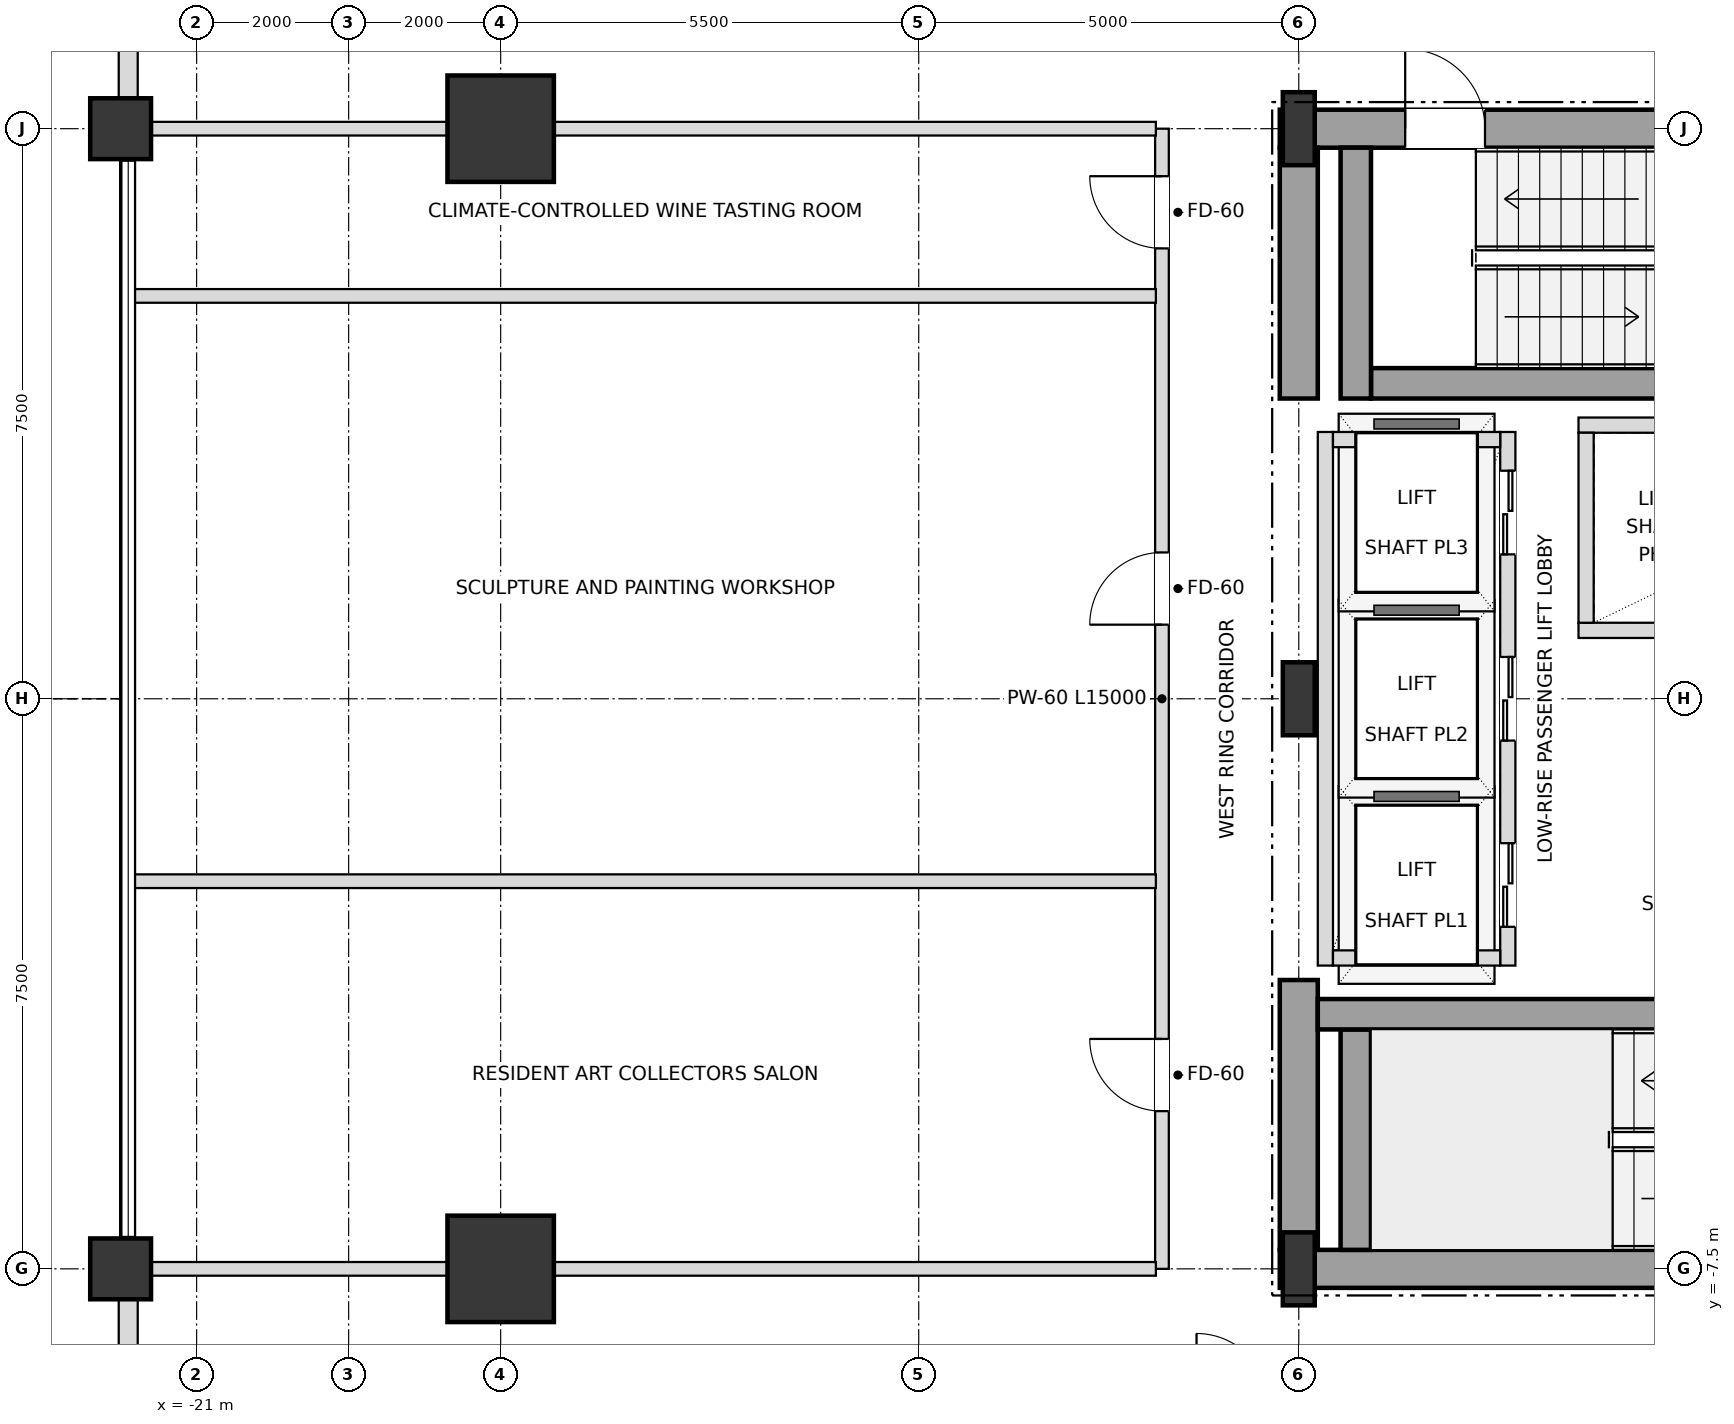
"""IFC4 building model, lengths in metres.
Left out: names, types, materials, properties, quantities, classifications, styles, units other than length and angle.
Written with IfcOpenShell. Run it as: python <this file> out.ifc"""

import sys

from ifc_helpers import new_model, si_unit, direction, frame, frame_2d, origin, origin_2d, place, context, subcontext, project, spatial, rectangle, i_section, extrude, element, fill, save


model = new_model("IFC4")
c1 = context("Model", 3, precision=1e-05, world=origin(), true_north=direction((0.0, 1.0)))
c2 = subcontext(c1, "Body", "Model", "MODEL_VIEW")
j1 = project(units=[si_unit("LENGTHUNIT", "METRE"), si_unit("PLANEANGLEUNIT", "RADIAN")], contexts=[c1])
p1 = place(None, origin())
s1 = spatial("IfcSite", under=j1, at=p1, CompositionType="ELEMENT")
p2 = place(p1, origin())
s2 = spatial("IfcBuilding", under=s1, at=p2, CompositionType="ELEMENT")
p3 = place(p2, frame((0.0, 0.0, 82.8)))
s3 = spatial("IfcBuildingStorey", under=s2, at=p3, CompositionType="ELEMENT", Elevation=82.8)
for number, where, z_axis, x_axis in (
    (1, (-6.5, -7.5, 0.0), (0.0, 0.0, 1.0), (1.0, 0.0, 0.0)),
    (2, (-6.5, 0.0, 0.0), (0.0, 0.0, 1.0), (1.0, 0.0, 0.0)),
    (3, (-6.5, 7.5, 0.0), (0.0, 0.0, 1.0), (1.0, 0.0, 0.0)),
):
    element("IfcColumn", number, at=place(p3, frame(where, z_axis=z_axis, x_axis=x_axis)), inside=s3, PredefinedType="COLUMN", context=c2, shape_type="SweptSolid", body=[
        extrude(i_section(OverallWidth=0.42, OverallDepth=0.96, WebThickness=0.022, FlangeThickness=0.034, at=origin_2d()), origin(), (0.0, 0.0, 1.0), 3.6),
    ])
for number, where, z_axis, x_axis in (
    (4, (-17.0, 7.5, 0.0), (0.0, 0.0, 1.0), (1.0, 0.0, 0.0)),
    (5, (-17.0, -7.5, 0.0), (0.0, 0.0, 1.0), (1.0, 0.0, 0.0)),
):
    element("IfcColumn", number, at=place(p3, frame(where, z_axis=z_axis, x_axis=x_axis)), inside=s3, PredefinedType="USERDEFINED", context=c2, shape_type="SweptSolid", body=[
        extrude(rectangle(XDim=1.4, YDim=1.4, at=origin_2d()), origin(), (0.0, 0.0, 1.0), 3.6),
    ])
for number, where, z_axis, x_axis in (
    (6, (-22.0, -7.5, 0.0), (0.0, 0.0, 1.0), (1.0, 0.0, 0.0)),
    (7, (-22.0, 7.5, 0.0), (0.0, 0.0, 1.0), (1.0, 0.0, 0.0)),
):
    element("IfcColumn", number, at=place(p3, frame(where, z_axis=z_axis, x_axis=x_axis)), inside=s3, PredefinedType="COLUMN", context=c2, shape_type="SweptSolid", body=[
        extrude(rectangle(XDim=0.8, YDim=0.8, at=origin_2d()), origin(), (0.0, 0.0, 1.0), 3.6),
    ])
p4 = place(p3, frame((-21.9, 12.605, 0.0), z_axis=(0.0, 0.0, 1.0), x_axis=(0.0, -1.0, 0.0)))
e8 = element("IfcWall", 8, at=p4, inside=s3, PredefinedType="SOLIDWALL", context=c2, shape_type="SweptSolid", body=[
    extrude(rectangle(XDim=4.71, YDim=0.25, at=frame_2d((2.355, 0.0))), origin(), (0.0, 0.0, 1.0), 2.736),
])
p5 = place(p4, frame((1.455, 0.0, 0.72)))
e9 = element("IfcOpeningElement", 9, at=p5, cuts=e8, PredefinedType="OPENING", context=c2, shape_type="SweptSolid", body=[
    extrude(rectangle(XDim=1.8, YDim=1.68, at=frame_2d((0.9, 0.84))), frame((0.0, 0.135, 0.0), z_axis=(0.0, -1.0, 0.0), x_axis=(1.0, 0.0, 0.0)), (0.0, 0.0, 1.0), 0.27),
])
p6 = place(p3, frame((-21.9, -7.895, 0.0), z_axis=(0.0, 0.0, 1.0), x_axis=(0.0, -1.0, 0.0)))
e10 = element("IfcWall", 10, at=p6, inside=s3, PredefinedType="SOLIDWALL", context=c2, shape_type="SweptSolid", body=[
    extrude(rectangle(XDim=4.71, YDim=0.25, at=frame_2d((2.355, 0.0))), origin(), (0.0, 0.0, 1.0), 2.736),
])
p7 = place(p6, frame((1.455, 0.0, 0.72)))
e11 = element("IfcOpeningElement", 11, at=p7, cuts=e10, PredefinedType="OPENING", context=c2, shape_type="SweptSolid", body=[
    extrude(rectangle(XDim=1.8, YDim=1.68, at=frame_2d((0.9, 0.84))), frame((0.0, 0.135, 0.0), z_axis=(0.0, -1.0, 0.0), x_axis=(1.0, 0.0, 0.0)), (0.0, 0.0, 1.0), 0.27),
])
p8 = place(p3, frame((-6.75, -7.5, 0.0), z_axis=(0.0, 0.0, 1.0), x_axis=(1.0, 0.0, 0.0)))
e12 = element("IfcWall", 12, at=p8, inside=s3, PredefinedType="SHEAR", context=c2, shape_type="SweptSolid", body=[
    extrude(rectangle(XDim=6.75, YDim=0.5, at=frame_2d((3.375, 0.0))), origin(), (0.0, 0.0, 1.0), 3.38),
])
p9 = place(p3, frame((-6.75, 7.5, 0.0), z_axis=(0.0, 0.0, 1.0), x_axis=(1.0, 0.0, 0.0)))
e13 = element("IfcWall", 13, at=p9, inside=s3, PredefinedType="SHEAR", context=c2, shape_type="SweptSolid", body=[
    extrude(rectangle(XDim=6.75, YDim=0.5, at=frame_2d((3.375, 0.0))), origin(), (0.0, 0.0, 1.0), 3.38),
])
p10 = place(p9, frame((1.65, 0.0, 0.0)))
e14 = element("IfcOpeningElement", 14, at=p10, cuts=e13, PredefinedType="OPENING", context=c2, shape_type="SweptSolid", body=[
    extrude(rectangle(XDim=1.05, YDim=2.15, at=frame_2d((0.525, 1.075))), frame((0.0, 0.26, 0.0), z_axis=(0.0, -1.0, 0.0), x_axis=(1.0, 0.0, 0.0)), (0.0, 0.0, 1.0), 0.52),
])
p11 = place(p3, frame((-6.5, -7.25, 0.0), z_axis=(0.0, 0.0, 1.0), x_axis=(0.0, 1.0, 0.0)))
e15 = element("IfcWall", 15, at=p11, inside=s3, PredefinedType="SHEAR", context=c2, shape_type="SweptSolid", body=[
    extrude(rectangle(XDim=3.55, YDim=0.5, at=frame_2d((1.775, 0.0))), origin(), (0.0, 0.0, 1.0), 3.38),
])
p12 = place(p3, frame((-6.5, 3.95, 0.0), z_axis=(0.0, 0.0, 1.0), x_axis=(0.0, 1.0, 0.0)))
e16 = element("IfcWall", 16, at=p12, inside=s3, PredefinedType="SHEAR", context=c2, shape_type="SweptSolid", body=[
    extrude(rectangle(XDim=3.3, YDim=0.5, at=frame_2d((1.65, 0.0))), origin(), (0.0, 0.0, 1.0), 3.38),
])
p13 = place(p3, frame((-5.75, -7.25, 0.0), z_axis=(0.0, 0.0, 1.0), x_axis=(0.0, 1.0, 0.0)))
e17 = element("IfcWall", 17, at=p13, inside=s3, PredefinedType="SHEAR", context=c2, shape_type="SweptSolid", body=[
    extrude(rectangle(XDim=2.9, YDim=0.4, at=frame_2d((1.45, 0.0))), origin(), (0.0, 0.0, 1.0), 3.38),
])
p14 = place(p3, frame((-6.25, -4.15, 0.0), z_axis=(0.0, 0.0, 1.0), x_axis=(1.0, 0.0, 0.0)))
e18 = element("IfcWall", 18, at=p14, inside=s3, PredefinedType="SHEAR", context=c2, shape_type="SweptSolid", body=[
    extrude(rectangle(XDim=7.78, YDim=0.4, at=frame_2d((3.89, 0.0))), origin(), (0.0, 0.0, 1.0), 3.38),
])
p15 = place(p3, frame((-5.55, 4.15, 0.0), z_axis=(0.0, 0.0, 1.0), x_axis=(1.0, 0.0, 0.0)))
e19 = element("IfcWall", 19, at=p15, inside=s3, PredefinedType="SHEAR", context=c2, shape_type="SweptSolid", body=[
    extrude(rectangle(XDim=7.08, YDim=0.4, at=frame_2d((3.54, 0.0))), origin(), (0.0, 0.0, 1.0), 3.38),
])
p16 = place(p3, frame((-5.75, 3.95, 0.0), z_axis=(0.0, 0.0, 1.0), x_axis=(0.0, 1.0, 0.0)))
e20 = element("IfcWall", 20, at=p16, inside=s3, PredefinedType="SHEAR", context=c2, shape_type="SweptSolid", body=[
    extrude(rectangle(XDim=3.3, YDim=0.4, at=frame_2d((1.65, 0.0))), origin(), (0.0, 0.0, 1.0), 3.38),
])
p17 = place(p3, frame((-3.75, -3.51, 0.0), z_axis=(0.0, 0.0, 1.0), x_axis=(0.0, 1.0, 0.0)))
e21 = element("IfcWall", 21, at=p17, inside=s3, PredefinedType="SOLIDWALL", context=c2, shape_type="SweptSolid", body=[
    extrude(rectangle(XDim=7.02, YDim=0.2, at=frame_2d((3.51, 0.0))), origin(), (0.0, 0.0, 1.0), 3.38),
])
p18 = place(p17, frame((0.51, 0.0, 0.0)))
e22 = element("IfcOpeningElement", 22, at=p18, cuts=e21, PredefinedType="OPENING", context=c2, shape_type="SweptSolid", body=[
    extrude(rectangle(XDim=1.1, YDim=2.15, at=frame_2d((0.55, 1.075))), frame((0.0, 0.11, 0.0), z_axis=(0.0, -1.0, 0.0), x_axis=(1.0, 0.0, 0.0)), (0.0, 0.0, 1.0), 0.22),
])
p19 = place(p17, frame((2.96, 0.0, 0.0)))
e23 = element("IfcOpeningElement", 23, at=p19, cuts=e21, PredefinedType="OPENING", context=c2, shape_type="SweptSolid", body=[
    extrude(rectangle(XDim=1.1, YDim=2.15, at=frame_2d((0.55, 1.075))), frame((0.0, 0.11, 0.0), z_axis=(0.0, -1.0, 0.0), x_axis=(1.0, 0.0, 0.0)), (0.0, 0.0, 1.0), 0.22),
])
p20 = place(p17, frame((5.41, 0.0, 0.0)))
e24 = element("IfcOpeningElement", 24, at=p20, cuts=e21, PredefinedType="OPENING", context=c2, shape_type="SweptSolid", body=[
    extrude(rectangle(XDim=1.1, YDim=2.15, at=frame_2d((0.55, 1.075))), frame((0.0, 0.11, 0.0), z_axis=(0.0, -1.0, 0.0), x_axis=(1.0, 0.0, 0.0)), (0.0, 0.0, 1.0), 0.22),
])
p21 = place(p3, frame((-6.15, -3.51, 0.0), z_axis=(0.0, 0.0, 1.0), x_axis=(0.0, 1.0, 0.0)))
e25 = element("IfcWall", 25, at=p21, inside=s3, PredefinedType="SOLIDWALL", context=c2, shape_type="SweptSolid", body=[
    extrude(rectangle(XDim=7.02, YDim=0.2, at=frame_2d((3.51, 0.0))), origin(), (0.0, 0.0, 1.0), 3.38),
])
for number, where, z_axis, x_axis in (
    (26, (-6.05, -3.41, 0.0), (0.0, 0.0, 1.0), (1.0, 0.0, 0.0)),
    (27, (-6.05, 3.41, 0.0), (0.0, 0.0, 1.0), (1.0, 0.0, 0.0)),
):
    element("IfcWall", number, at=place(p3, frame(where, z_axis=z_axis, x_axis=x_axis)), inside=s3, PredefinedType="SOLIDWALL", context=c2, shape_type="SweptSolid", body=[
        extrude(rectangle(XDim=2.2, YDim=0.2, at=frame_2d((1.1, 0.0))), origin(), (0.0, 0.0, 1.0), 3.38),
    ])
p22 = place(p3, frame((-2.82, 0.9, 0.0), z_axis=(0.0, 0.0, 1.0), x_axis=(1.0, 0.0, 0.0)))
e28 = element("IfcWall", 28, at=p22, inside=s3, PredefinedType="SOLIDWALL", context=c2, shape_type="SweptSolid", body=[
    extrude(rectangle(XDim=5.58, YDim=0.2, at=frame_2d((2.79, 0.0))), origin(), (0.0, 0.0, 1.0), 3.38),
])
p23 = place(p22, frame((3.86, 0.0, 0.0)))
e29 = element("IfcOpeningElement", 29, at=p23, cuts=e28, PredefinedType="OPENING", context=c2, shape_type="SweptSolid", body=[
    extrude(rectangle(XDim=1.2, YDim=2.2, at=frame_2d((0.6, 1.1))), frame((0.0, 0.11, 0.0), z_axis=(0.0, -1.0, 0.0), x_axis=(1.0, 0.0, 0.0)), (0.0, 0.0, 1.0), 0.22),
])
p24 = place(p3, frame((-2.82, 3.6, 0.0), z_axis=(0.0, 0.0, 1.0), x_axis=(1.0, 0.0, 0.0)))
e30 = element("IfcWall", 30, at=p24, inside=s3, PredefinedType="SOLIDWALL", context=c2, shape_type="SweptSolid", body=[
    extrude(rectangle(XDim=5.58, YDim=0.2, at=frame_2d((2.79, 0.0))), origin(), (0.0, 0.0, 1.0), 3.38),
])
p25 = place(p3, frame((-2.72, 1.0, 0.0), z_axis=(0.0, 0.0, 1.0), x_axis=(0.0, 1.0, 0.0)))
e31 = element("IfcWall", 31, at=p25, inside=s3, PredefinedType="SOLIDWALL", context=c2, shape_type="SweptSolid", body=[
    extrude(rectangle(XDim=2.5, YDim=0.2, at=frame_2d((1.25, 0.0))), origin(), (0.0, 0.0, 1.0), 3.38),
])
p26 = place(p3, frame((-8.3, -7.5, 0.0), z_axis=(0.0, 0.0, 1.0), x_axis=(0.0, 1.0, 0.0)))
e32 = element("IfcWall", 32, at=p26, inside=s3, PredefinedType="PARTITIONING", context=c2, shape_type="SweptSolid", body=[
    extrude(rectangle(XDim=15.0, YDim=0.18, at=frame_2d((7.5, 0.0))), origin(), (0.0, 0.0, 1.0), 3.38),
])
p27 = place(p26, frame((2.075, 0.0, 0.0)))
e33 = element("IfcOpeningElement", 33, at=p27, cuts=e32, PredefinedType="OPENING", context=c2, shape_type="SweptSolid", body=[
    extrude(rectangle(XDim=0.95, YDim=2.15, at=frame_2d((0.475, 1.075))), frame((0.0, 0.1, 0.0), z_axis=(0.0, -1.0, 0.0), x_axis=(1.0, 0.0, 0.0)), (0.0, 0.0, 1.0), 0.2),
])
p28 = place(p26, frame((8.475, 0.0, 0.0)))
e34 = element("IfcOpeningElement", 34, at=p28, cuts=e32, PredefinedType="OPENING", context=c2, shape_type="SweptSolid", body=[
    extrude(rectangle(XDim=0.95, YDim=2.15, at=frame_2d((0.475, 1.075))), frame((0.0, 0.1, 0.0), z_axis=(0.0, -1.0, 0.0), x_axis=(1.0, 0.0, 0.0)), (0.0, 0.0, 1.0), 0.2),
])
p29 = place(p26, frame((13.425, 0.0, 0.0)))
e35 = element("IfcOpeningElement", 35, at=p29, cuts=e32, PredefinedType="OPENING", context=c2, shape_type="SweptSolid", body=[
    extrude(rectangle(XDim=0.95, YDim=2.15, at=frame_2d((0.475, 1.075))), frame((0.0, 0.1, 0.0), z_axis=(0.0, -1.0, 0.0), x_axis=(1.0, 0.0, 0.0)), (0.0, 0.0, 1.0), 0.2),
])
p30 = place(p3, frame((-21.9, -7.5, 0.0), z_axis=(0.0, 0.0, 1.0), x_axis=(1.0, 0.0, 0.0)))
e36 = element("IfcWall", 36, at=p30, inside=s3, PredefinedType="PARTITIONING", context=c2, shape_type="SweptSolid", body=[
    extrude(rectangle(XDim=13.52, YDim=0.18, at=frame_2d((6.76, 0.0))), origin(), (0.0, 0.0, 1.0), 2.816),
])
for number, where, z_axis, x_axis in (
    (37, (-21.82, -2.4, 0.0), (0.0, 0.0, 1.0), (1.0, 0.0, 0.0)),
    (38, (-21.82, 5.3, 0.0), (0.0, 0.0, 1.0), (1.0, 0.0, 0.0)),
):
    element("IfcWall", number, at=place(p3, frame(where, z_axis=z_axis, x_axis=x_axis)), inside=s3, PredefinedType="PARTITIONING", context=c2, shape_type="SweptSolid", body=[
        extrude(rectangle(XDim=13.44, YDim=0.18, at=frame_2d((6.72, 0.0))), origin(), (0.0, 0.0, 1.0), 2.816),
    ])
p31 = place(p3, frame((-21.9, 7.5, 0.0), z_axis=(0.0, 0.0, 1.0), x_axis=(1.0, 0.0, 0.0)))
e39 = element("IfcWall", 39, at=p31, inside=s3, PredefinedType="PARTITIONING", context=c2, shape_type="SweptSolid", body=[
    extrude(rectangle(XDim=13.52, YDim=0.18, at=frame_2d((6.76, 0.0))), origin(), (0.0, 0.0, 1.0), 2.816),
])
p32 = place(p10, origin())
e40 = element("IfcDoor", 40, at=p32, inside=s3, OperationType="SINGLE_SWING_LEFT", PredefinedType="DOOR", context=c2, shape_type="SweptSolid", body=[
    extrude(rectangle(XDim=1.05, YDim=2.15, at=frame_2d((0.525, 1.075))), frame((0.0, 0.025, 0.0), z_axis=(0.0, -1.0, 0.0), x_axis=(1.0, 0.0, 0.0)), (0.0, 0.0, 1.0), 0.05),
])
fill(e14, e40)
p33 = place(p18, origin())
e41 = element("IfcDoor", 41, at=p33, inside=s3, OperationType="DOUBLE_DOOR_SLIDING", PredefinedType="DOOR", context=c2, shape_type="SweptSolid", body=[
    extrude(rectangle(XDim=1.1, YDim=2.15, at=frame_2d((0.55, 1.075))), frame((0.0, 0.025, 0.0), z_axis=(0.0, -1.0, 0.0), x_axis=(1.0, 0.0, 0.0)), (0.0, 0.0, 1.0), 0.05),
])
fill(e22, e41)
p34 = place(p19, origin())
e42 = element("IfcDoor", 42, at=p34, inside=s3, OperationType="DOUBLE_DOOR_SLIDING", PredefinedType="DOOR", context=c2, shape_type="SweptSolid", body=[
    extrude(rectangle(XDim=1.1, YDim=2.15, at=frame_2d((0.55, 1.075))), frame((0.0, 0.025, 0.0), z_axis=(0.0, -1.0, 0.0), x_axis=(1.0, 0.0, 0.0)), (0.0, 0.0, 1.0), 0.05),
])
fill(e23, e42)
p35 = place(p20, origin())
e43 = element("IfcDoor", 43, at=p35, inside=s3, OperationType="DOUBLE_DOOR_SLIDING", PredefinedType="DOOR", context=c2, shape_type="SweptSolid", body=[
    extrude(rectangle(XDim=1.1, YDim=2.15, at=frame_2d((0.55, 1.075))), frame((0.0, 0.025, 0.0), z_axis=(0.0, -1.0, 0.0), x_axis=(1.0, 0.0, 0.0)), (0.0, 0.0, 1.0), 0.05),
])
fill(e24, e43)
p36 = place(p27, origin())
e44 = element("IfcDoor", 44, at=p36, inside=s3, OperationType="SINGLE_SWING_RIGHT", PredefinedType="DOOR", context=c2, shape_type="SweptSolid", body=[
    extrude(rectangle(XDim=0.95, YDim=2.15, at=frame_2d((0.475, 1.075))), frame((0.0, 0.025, 0.0), z_axis=(0.0, -1.0, 0.0), x_axis=(1.0, 0.0, 0.0)), (0.0, 0.0, 1.0), 0.05),
])
fill(e33, e44)
p37 = place(p28, origin())
e45 = element("IfcDoor", 45, at=p37, inside=s3, OperationType="SINGLE_SWING_LEFT", PredefinedType="DOOR", context=c2, shape_type="SweptSolid", body=[
    extrude(rectangle(XDim=0.95, YDim=2.15, at=frame_2d((0.475, 1.075))), frame((0.0, 0.025, 0.0), z_axis=(0.0, -1.0, 0.0), x_axis=(1.0, 0.0, 0.0)), (0.0, 0.0, 1.0), 0.05),
])
fill(e34, e45)
p38 = place(p29, origin())
e46 = element("IfcDoor", 46, at=p38, inside=s3, OperationType="SINGLE_SWING_RIGHT", PredefinedType="DOOR", context=c2, shape_type="SweptSolid", body=[
    extrude(rectangle(XDim=0.95, YDim=2.15, at=frame_2d((0.475, 1.075))), frame((0.0, 0.025, 0.0), z_axis=(0.0, -1.0, 0.0), x_axis=(1.0, 0.0, 0.0)), (0.0, 0.0, 1.0), 0.05),
])
fill(e35, e46)
save(model, sys.argv[1])
